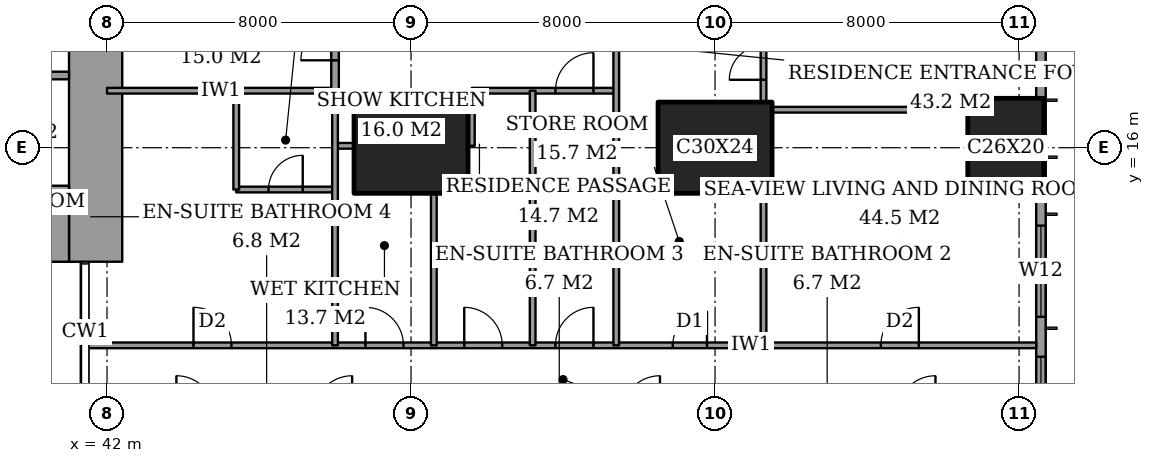
"""IFC4 building model, lengths in metres.
Left out: names, types, materials, properties, quantities, classifications, styles, units other than length and angle.
Written with IfcOpenShell. Run it as: python <this file> out.ifc"""

import sys

from ifc_helpers import new_model, si_unit, direction, frame, frame_2d, origin, origin_2d, place, context, subcontext, project, spatial, rectangle, extrude, element, fill, save


model = new_model("IFC4")
c1 = context("Model", 3, precision=1e-05, world=origin(), true_north=direction((0.0, 1.0)))
c2 = subcontext(c1, "Body", "Model", "MODEL_VIEW")
j1 = project(units=[si_unit("LENGTHUNIT", "METRE"), si_unit("PLANEANGLEUNIT", "RADIAN")], contexts=[c1])
p1 = place(None, origin())
s1 = spatial("IfcSite", under=j1, at=p1, CompositionType="ELEMENT")
p2 = place(p1, origin())
s2 = spatial("IfcBuilding", under=s1, at=p2, CompositionType="ELEMENT")
p3 = place(p2, frame((0.0, 0.0, 128.6)))
s3 = spatial("IfcBuildingStorey", under=s2, at=p3, CompositionType="ELEMENT", Elevation=128.6)
for number, where, z_axis, x_axis in (
    (1, (50.0, 16.0, 0.0), (0.0, 0.0, 1.0), (1.0, 0.0, 0.0)),
    (2, (58.0, 16.0, 0.0), (0.0, 0.0, 1.0), (1.0, 0.0, 0.0)),
):
    element("IfcColumn", number, at=place(p3, frame(where, z_axis=z_axis, x_axis=x_axis)), inside=s3, PredefinedType="COLUMN", context=c2, shape_type="SweptSolid", body=[
        extrude(rectangle(XDim=3.0, YDim=2.4, at=origin_2d()), origin(), (0.0, 0.0, 1.0), 3.6),
    ])
p4 = place(p3, frame((65.65, 16.0, 0.0), z_axis=(0.0, 0.0, 1.0), x_axis=(0.0, 1.0, 0.0)))
e3 = element("IfcColumn", 3, at=p4, inside=s3, PredefinedType="COLUMN", context=c2, shape_type="SweptSolid", body=[
    extrude(rectangle(XDim=2.6, YDim=2.0, at=origin_2d()), origin(), (0.0, 0.0, 1.0), 3.6),
])
p5 = place(p3, frame((37.85, 14.0, 0.0), z_axis=(0.0, 0.0, 1.0), x_axis=(1.0, 0.0, 0.0)))
e4 = element("IfcWall", 4, at=p5, inside=s3, PredefinedType="SHEAR", context=c2, shape_type="SweptSolid", body=[
    extrude(rectangle(XDim=3.15, YDim=2.0, at=frame_2d((1.575, 0.0))), origin(), (0.0, 0.0, 1.0), 3.6),
])
p6 = place(p3, frame((41.7, 13.0, 0.0), z_axis=(0.0, 0.0, 1.0), x_axis=(0.0, 1.0, 0.0)))
e5 = element("IfcWall", 5, at=p6, inside=s3, PredefinedType="SHEAR", context=c2, shape_type="SweptSolid", body=[
    extrude(rectangle(XDim=11.85, YDim=1.4, at=frame_2d((5.925, 0.0))), origin(), (0.0, 0.0, 1.0), 3.6),
])
p7 = place(p6, frame((7.5, 0.0, 0.0)))
e6 = element("IfcOpeningElement", 6, at=p7, cuts=e5, PredefinedType="OPENING", context=c2, shape_type="SweptSolid", body=[
    extrude(rectangle(XDim=1.8, YDim=2.4, at=frame_2d((0.9, 1.2))), frame((0.0, 0.71, 0.0), z_axis=(0.0, -1.0, 0.0), x_axis=(1.0, 0.0, 0.0)), (0.0, 0.0, 1.0), 1.42),
])
p8 = place(p3, frame((66.575, 3.175, 0.0), z_axis=(0.0, 0.0, 1.0), x_axis=(0.0, 1.0, 0.0)))
e7 = element("IfcWall", 7, at=p8, inside=s3, PredefinedType="SOLIDWALL", context=c2, shape_type="SweptSolid", body=[
    extrude(rectangle(XDim=41.65, YDim=0.25, at=frame_2d((20.825, 0.0))), origin(), (0.0, 0.0, 1.0), 3.6),
])
p9 = place(p8, frame((0.775, 0.0, 0.4)))
e8 = element("IfcOpeningElement", 8, at=p9, cuts=e7, PredefinedType="OPENING", context=c2, shape_type="SweptSolid", body=[
    extrude(rectangle(XDim=2.4, YDim=2.2, at=frame_2d((1.2, 1.1))), frame((0.0, 0.135, 0.0), z_axis=(0.0, -1.0, 0.0), x_axis=(1.0, 0.0, 0.0)), (0.0, 0.0, 1.0), 0.27),
])
p10 = place(p8, frame((6.125, 0.0, 0.4)))
e9 = element("IfcOpeningElement", 9, at=p10, cuts=e7, PredefinedType="OPENING", context=c2, shape_type="SweptSolid", body=[
    extrude(rectangle(XDim=1.2, YDim=2.2, at=frame_2d((0.6, 1.1))), frame((0.0, 0.135, 0.0), z_axis=(0.0, -1.0, 0.0), x_axis=(1.0, 0.0, 0.0)), (0.0, 0.0, 1.0), 0.27),
])
p11 = place(p8, frame((8.375, 0.0, 0.4)))
e10 = element("IfcOpeningElement", 10, at=p11, cuts=e7, PredefinedType="OPENING", context=c2, shape_type="SweptSolid", body=[
    extrude(rectangle(XDim=2.4, YDim=2.2, at=frame_2d((1.2, 1.1))), frame((0.0, 0.135, 0.0), z_axis=(0.0, -1.0, 0.0), x_axis=(1.0, 0.0, 0.0)), (0.0, 0.0, 1.0), 0.27),
])
p12 = place(p8, frame((15.775, 0.0, 0.4)))
e11 = element("IfcOpeningElement", 11, at=p12, cuts=e7, PredefinedType="OPENING", context=c2, shape_type="SweptSolid", body=[
    extrude(rectangle(XDim=2.4, YDim=2.2, at=frame_2d((1.2, 1.1))), frame((0.0, 0.135, 0.0), z_axis=(0.0, -1.0, 0.0), x_axis=(1.0, 0.0, 0.0)), (0.0, 0.0, 1.0), 0.27),
])
p13 = place(p8, frame((23.475, 0.0, 0.4)))
e12 = element("IfcOpeningElement", 12, at=p13, cuts=e7, PredefinedType="OPENING", context=c2, shape_type="SweptSolid", body=[
    extrude(rectangle(XDim=2.4, YDim=2.2, at=frame_2d((1.2, 1.1))), frame((0.0, 0.135, 0.0), z_axis=(0.0, -1.0, 0.0), x_axis=(1.0, 0.0, 0.0)), (0.0, 0.0, 1.0), 0.27),
])
p14 = place(p8, frame((30.975, 0.0, 0.4)))
e13 = element("IfcOpeningElement", 13, at=p14, cuts=e7, PredefinedType="OPENING", context=c2, shape_type="SweptSolid", body=[
    extrude(rectangle(XDim=2.4, YDim=2.2, at=frame_2d((1.2, 1.1))), frame((0.0, 0.135, 0.0), z_axis=(0.0, -1.0, 0.0), x_axis=(1.0, 0.0, 0.0)), (0.0, 0.0, 1.0), 0.27),
])
p15 = place(p8, frame((34.5, 0.0, 0.4)))
e14 = element("IfcOpeningElement", 14, at=p15, cuts=e7, PredefinedType="OPENING", context=c2, shape_type="SweptSolid", body=[
    extrude(rectangle(XDim=1.2, YDim=2.2, at=frame_2d((0.6, 1.1))), frame((0.0, 0.135, 0.0), z_axis=(0.0, -1.0, 0.0), x_axis=(1.0, 0.0, 0.0)), (0.0, 0.0, 1.0), 0.27),
])
p16 = place(p8, frame((38.475, 0.0, 0.4)))
e15 = element("IfcOpeningElement", 15, at=p16, cuts=e7, PredefinedType="OPENING", context=c2, shape_type="SweptSolid", body=[
    extrude(rectangle(XDim=2.4, YDim=2.2, at=frame_2d((1.2, 1.1))), frame((0.0, 0.135, 0.0), z_axis=(0.0, -1.0, 0.0), x_axis=(1.0, 0.0, 0.0)), (0.0, 0.0, 1.0), 0.27),
])
p17 = place(p3, frame((41.439, 10.8, 0.0), z_axis=(0.0, 0.0, 1.0), x_axis=(1.0, 0.0, 0.0)))
e16 = element("IfcWall", 16, at=p17, inside=s3, PredefinedType="PARTITIONING", context=c2, shape_type="SweptSolid", body=[
    extrude(rectangle(XDim=25.011, YDim=0.15, at=frame_2d((12.505, 0.0))), origin(), (0.0, 0.0, 1.0), 3.35),
])
p18 = place(p17, frame((12.361, 0.0, 0.0)))
e17 = element("IfcOpeningElement", 17, at=p18, cuts=e16, PredefinedType="OPENING", context=c2, shape_type="SweptSolid", body=[
    extrude(rectangle(XDim=1.0, YDim=2.1, at=frame_2d((0.5, 1.05))), frame((0.0, 0.085, 0.0), z_axis=(0.0, -1.0, 0.0), x_axis=(1.0, 0.0, 0.0)), (0.0, 0.0, 1.0), 0.17),
])
p19 = place(p17, frame((20.924, 0.0, 0.0)))
e18 = element("IfcOpeningElement", 18, at=p19, cuts=e16, PredefinedType="OPENING", context=c2, shape_type="SweptSolid", body=[
    extrude(rectangle(XDim=1.0, YDim=2.1, at=frame_2d((0.5, 1.05))), frame((0.0, 0.085, 0.0), z_axis=(0.0, -1.0, 0.0), x_axis=(1.0, 0.0, 0.0)), (0.0, 0.0, 1.0), 0.17),
])
p20 = place(p17, frame((15.448, 0.0, 0.0)))
e19 = element("IfcOpeningElement", 19, at=p20, cuts=e16, PredefinedType="OPENING", context=c2, shape_type="SweptSolid", body=[
    extrude(rectangle(XDim=0.9, YDim=2.1, at=frame_2d((0.45, 1.05))), frame((0.0, 0.085, 0.0), z_axis=(0.0, -1.0, 0.0), x_axis=(1.0, 0.0, 0.0)), (0.0, 0.0, 1.0), 0.17),
])
p21 = place(p17, frame((9.961, 0.0, 0.0)))
e20 = element("IfcOpeningElement", 20, at=p21, cuts=e16, PredefinedType="OPENING", context=c2, shape_type="SweptSolid", body=[
    extrude(rectangle(XDim=1.0, YDim=2.1, at=frame_2d((0.5, 1.05))), frame((0.0, 0.085, 0.0), z_axis=(0.0, -1.0, 0.0), x_axis=(1.0, 0.0, 0.0)), (0.0, 0.0, 1.0), 0.17),
])
p22 = place(p17, frame((7.361, 0.0, 0.0)))
e21 = element("IfcOpeningElement", 21, at=p22, cuts=e16, PredefinedType="OPENING", context=c2, shape_type="SweptSolid", body=[
    extrude(rectangle(XDim=1.0, YDim=2.1, at=frame_2d((0.5, 1.05))), frame((0.0, 0.085, 0.0), z_axis=(0.0, -1.0, 0.0), x_axis=(1.0, 0.0, 0.0)), (0.0, 0.0, 1.0), 0.17),
])
p23 = place(p17, frame((2.836, 0.0, 0.0)))
e22 = element("IfcOpeningElement", 22, at=p23, cuts=e16, PredefinedType="OPENING", context=c2, shape_type="SweptSolid", body=[
    extrude(rectangle(XDim=1.0, YDim=2.1, at=frame_2d((0.5, 1.05))), frame((0.0, 0.085, 0.0), z_axis=(0.0, -1.0, 0.0), x_axis=(1.0, 0.0, 0.0)), (0.0, 0.0, 1.0), 0.17),
])
p24 = place(p3, frame((45.4, 14.9, 0.0), z_axis=(0.0, 0.0, 1.0), x_axis=(1.0, 0.0, 0.0)))
e23 = element("IfcWall", 23, at=p24, inside=s3, PredefinedType="PARTITIONING", context=c2, shape_type="SweptSolid", body=[
    extrude(rectangle(XDim=2.6, YDim=0.15, at=frame_2d((1.3, 0.0))), origin(), (0.0, 0.0, 1.0), 3.35),
])
p25 = place(p24, frame((0.85, 0.0, 0.0)))
e24 = element("IfcOpeningElement", 24, at=p25, cuts=e23, PredefinedType="OPENING", context=c2, shape_type="SweptSolid", body=[
    extrude(rectangle(XDim=0.9, YDim=2.1, at=frame_2d((0.45, 1.05))), frame((0.0, 0.085, 0.0), z_axis=(0.0, -1.0, 0.0), x_axis=(1.0, 0.0, 0.0)), (0.0, 0.0, 1.0), 0.17),
])
p26 = place(p3, frame((55.4, 15.0, 0.0), z_axis=(0.0, 0.0, 1.0), x_axis=(1.0, 0.0, 0.0)))
e25 = element("IfcWall", 25, at=p26, inside=s3, PredefinedType="PARTITIONING", context=c2, shape_type="SweptSolid", body=[
    extrude(rectangle(XDim=1.1, YDim=0.15, at=frame_2d((0.55, 0.0))), origin(), (0.0, 0.0, 1.0), 3.35),
])
p27 = place(p3, frame((48.0, 16.05, 0.0), z_axis=(0.0, 0.0, 1.0), x_axis=(1.0, 0.0, 0.0)))
e26 = element("IfcWall", 26, at=p27, inside=s3, PredefinedType="PARTITIONING", context=c2, shape_type="SweptSolid", body=[
    extrude(rectangle(XDim=0.5, YDim=0.15, at=frame_2d((0.25, 0.0))), origin(), (0.0, 0.0, 1.0), 3.35),
])
p28 = place(p3, frame((59.5, 17.0, 0.0), z_axis=(0.0, 0.0, 1.0), x_axis=(1.0, 0.0, 0.0)))
e27 = element("IfcWall", 27, at=p28, inside=s3, PredefinedType="PARTITIONING", context=c2, shape_type="SweptSolid", body=[
    extrude(rectangle(XDim=5.15, YDim=0.15, at=frame_2d((2.575, 0.0))), origin(), (0.0, 0.0, 1.0), 3.35),
])
p29 = place(p3, frame((42.0, 17.5, 0.0), z_axis=(0.0, 0.0, 1.0), x_axis=(1.0, 0.0, 0.0)))
e28 = element("IfcWall", 28, at=p29, inside=s3, PredefinedType="PARTITIONING", context=c2, shape_type="SweptSolid", body=[
    extrude(rectangle(XDim=6.0, YDim=0.15, at=frame_2d((3.0, 0.0))), origin(), (0.0, 0.0, 1.0), 3.35),
])
p30 = place(p3, frame((51.6, 17.5, 0.0), z_axis=(0.0, 0.0, 1.0), x_axis=(1.0, 0.0, 0.0)))
e29 = element("IfcWall", 29, at=p30, inside=s3, PredefinedType="PARTITIONING", context=c2, shape_type="SweptSolid", body=[
    extrude(rectangle(XDim=3.8, YDim=0.15, at=frame_2d((1.9, 0.0))), origin(), (0.0, 0.0, 1.0), 3.35),
])
p31 = place(p30, frame((2.2, 0.0, 0.0)))
e30 = element("IfcOpeningElement", 30, at=p31, cuts=e29, PredefinedType="OPENING", context=c2, shape_type="SweptSolid", body=[
    extrude(rectangle(XDim=1.0, YDim=2.1, at=frame_2d((0.5, 1.05))), frame((0.0, 0.085, 0.0), z_axis=(0.0, -1.0, 0.0), x_axis=(1.0, 0.0, 0.0)), (0.0, 0.0, 1.0), 0.17),
])
p32 = place(p3, frame((45.4, 14.9, 0.0), z_axis=(0.0, 0.0, 1.0), x_axis=(0.0, 1.0, 0.0)))
e31 = element("IfcWall", 31, at=p32, inside=s3, PredefinedType="PARTITIONING", context=c2, shape_type="SweptSolid", body=[
    extrude(rectangle(XDim=2.6, YDim=0.15, at=frame_2d((1.3, 0.0))), origin(), (0.0, 0.0, 1.0), 3.35),
])
p33 = place(p3, frame((48.0, 17.5, 0.0), z_axis=(0.0, 0.0, 1.0), x_axis=(0.0, 1.0, 0.0)))
e32 = element("IfcWall", 32, at=p33, inside=s3, PredefinedType="PARTITIONING", context=c2, shape_type="SweptSolid", body=[
    extrude(rectangle(XDim=6.5, YDim=0.2, at=frame_2d((3.25, 0.0))), origin(), (0.0, 0.0, 1.0), 3.35),
])
p34 = place(p33, frame((3.9, 0.0, 0.0)))
e33 = element("IfcOpeningElement", 33, at=p34, cuts=e32, PredefinedType="OPENING", context=c2, shape_type="SweptSolid", body=[
    extrude(rectangle(XDim=1.2, YDim=2.4, at=frame_2d((0.6, 1.2))), frame((0.0, 0.11, 0.0), z_axis=(0.0, -1.0, 0.0), x_axis=(1.0, 0.0, 0.0)), (0.0, 0.0, 1.0), 0.22),
])
p35 = place(p33, frame((0.8, 0.0, 0.0)))
e34 = element("IfcOpeningElement", 34, at=p35, cuts=e32, PredefinedType="OPENING", context=c2, shape_type="SweptSolid", body=[
    extrude(rectangle(XDim=0.9, YDim=2.1, at=frame_2d((0.45, 1.05))), frame((0.0, 0.11, 0.0), z_axis=(0.0, -1.0, 0.0), x_axis=(1.0, 0.0, 0.0)), (0.0, 0.0, 1.0), 0.22),
])
p36 = place(p3, frame((48.0, 10.8, 0.0), z_axis=(0.0, 0.0, 1.0), x_axis=(0.0, 1.0, 0.0)))
e35 = element("IfcWall", 35, at=p36, inside=s3, PredefinedType="PARTITIONING", context=c2, shape_type="SweptSolid", body=[
    extrude(rectangle(XDim=6.7, YDim=0.15, at=frame_2d((3.35, 0.0))), origin(), (0.0, 0.0, 1.0), 3.35),
])
p37 = place(p3, frame((50.6, 10.8, 0.0), z_axis=(0.0, 0.0, 1.0), x_axis=(0.0, 1.0, 0.0)))
e36 = element("IfcWall", 36, at=p37, inside=s3, PredefinedType="PARTITIONING", context=c2, shape_type="SweptSolid", body=[
    extrude(rectangle(XDim=4.0, YDim=0.15, at=frame_2d((2.0, 0.0))), origin(), (0.0, 0.0, 1.0), 3.35),
])
p38 = place(p3, frame((51.6, 16.05, 0.0), z_axis=(0.0, 0.0, 1.0), x_axis=(0.0, 1.0, 0.0)))
e37 = element("IfcWall", 37, at=p38, inside=s3, PredefinedType="PARTITIONING", context=c2, shape_type="SweptSolid", body=[
    extrude(rectangle(XDim=1.45, YDim=0.15, at=frame_2d((0.725, 0.0))), origin(), (0.0, 0.0, 1.0), 3.35),
])
p39 = place(p3, frame((53.2, 10.8, 0.0), z_axis=(0.0, 0.0, 1.0), x_axis=(0.0, 1.0, 0.0)))
e38 = element("IfcWall", 38, at=p39, inside=s3, PredefinedType="PARTITIONING", context=c2, shape_type="SweptSolid", body=[
    extrude(rectangle(XDim=6.7, YDim=0.15, at=frame_2d((3.35, 0.0))), origin(), (0.0, 0.0, 1.0), 3.35),
])
p40 = place(p3, frame((55.4, 10.8, 0.0), z_axis=(0.0, 0.0, 1.0), x_axis=(0.0, 1.0, 0.0)))
e39 = element("IfcWall", 39, at=p40, inside=s3, PredefinedType="PARTITIONING", context=c2, shape_type="SweptSolid", body=[
    extrude(rectangle(XDim=10.8, YDim=0.15, at=frame_2d((5.4, 0.0))), origin(), (0.0, 0.0, 1.0), 3.35),
])
p41 = place(p40, frame((8.25, 0.0, 0.0)))
e40 = element("IfcOpeningElement", 40, at=p41, cuts=e39, PredefinedType="OPENING", context=c2, shape_type="SweptSolid", body=[
    extrude(rectangle(XDim=1.0, YDim=2.1, at=frame_2d((0.5, 1.05))), frame((0.0, 0.085, 0.0), z_axis=(0.0, -1.0, 0.0), x_axis=(1.0, 0.0, 0.0)), (0.0, 0.0, 1.0), 0.17),
])
p42 = place(p3, frame((59.275, 10.8, 0.0), z_axis=(0.0, 0.0, 1.0), x_axis=(0.0, 1.0, 0.0)))
e41 = element("IfcWall", 41, at=p42, inside=s3, PredefinedType="PARTITIONING", context=c2, shape_type="SweptSolid", body=[
    extrude(rectangle(XDim=4.0, YDim=0.15, at=frame_2d((2.0, 0.0))), origin(), (0.0, 0.0, 1.0), 3.35),
])
p43 = place(p3, frame((59.275, 17.2, 0.0), z_axis=(0.0, 0.0, 1.0), x_axis=(0.0, 1.0, 0.0)))
e42 = element("IfcWall", 42, at=p43, inside=s3, PredefinedType="PARTITIONING", context=c2, shape_type="SweptSolid", body=[
    extrude(rectangle(XDim=2.45, YDim=0.15, at=frame_2d((1.225, 0.0))), origin(), (0.0, 0.0, 1.0), 3.35),
])
p44 = place(p43, frame((0.587, 0.0, 0.0)))
e43 = element("IfcOpeningElement", 43, at=p44, cuts=e42, PredefinedType="OPENING", context=c2, shape_type="SweptSolid", body=[
    extrude(rectangle(XDim=0.9, YDim=2.1, at=frame_2d((0.45, 1.05))), frame((0.0, 0.085, 0.0), z_axis=(0.0, -1.0, 0.0), x_axis=(1.0, 0.0, 0.0)), (0.0, 0.0, 1.0), 0.17),
])
p45 = place(p3, frame((28.3, 17.9, 0.0), z_axis=(0.0, 0.0, 1.0), x_axis=(1.0, 0.0, 0.0)))
e44 = element("IfcWall", 44, at=p45, inside=s3, PredefinedType="PARTITIONING", context=c2, shape_type="SweptSolid", body=[
    extrude(rectangle(XDim=12.7, YDim=0.2, at=frame_2d((6.35, 0.0))), origin(), (0.0, 0.0, 1.0), 3.6),
])
p46 = place(p45, frame((0.95, 0.0, 0.0)))
e45 = element("IfcOpeningElement", 45, at=p46, cuts=e44, PredefinedType="OPENING", context=c2, shape_type="SweptSolid", body=[
    extrude(rectangle(XDim=1.1, YDim=2.1, at=frame_2d((0.55, 1.05))), frame((0.0, 0.11, 0.0), z_axis=(0.0, -1.0, 0.0), x_axis=(1.0, 0.0, 0.0)), (0.0, 0.0, 1.0), 0.22),
])
p47 = place(p45, frame((4.15, 0.0, 0.0)))
e46 = element("IfcOpeningElement", 46, at=p47, cuts=e44, PredefinedType="OPENING", context=c2, shape_type="SweptSolid", body=[
    extrude(rectangle(XDim=1.1, YDim=2.1, at=frame_2d((0.55, 1.05))), frame((0.0, 0.11, 0.0), z_axis=(0.0, -1.0, 0.0), x_axis=(1.0, 0.0, 0.0)), (0.0, 0.0, 1.0), 0.22),
])
p48 = place(p45, frame((7.35, 0.0, 0.0)))
e47 = element("IfcOpeningElement", 47, at=p48, cuts=e44, PredefinedType="OPENING", context=c2, shape_type="SweptSolid", body=[
    extrude(rectangle(XDim=1.1, YDim=2.1, at=frame_2d((0.55, 1.05))), frame((0.0, 0.11, 0.0), z_axis=(0.0, -1.0, 0.0), x_axis=(1.0, 0.0, 0.0)), (0.0, 0.0, 1.0), 0.22),
])
p49 = place(p45, frame((10.6, 0.0, 0.0)))
e48 = element("IfcOpeningElement", 48, at=p49, cuts=e44, PredefinedType="OPENING", context=c2, shape_type="SweptSolid", body=[
    extrude(rectangle(XDim=1.2, YDim=2.1, at=frame_2d((0.6, 1.05))), frame((0.0, 0.11, 0.0), z_axis=(0.0, -1.0, 0.0), x_axis=(1.0, 0.0, 0.0)), (0.0, 0.0, 1.0), 0.22),
])
p50 = place(p10, origin())
e49 = element("IfcWindow", 49, at=p50, inside=s3, PartitioningType="SINGLE_PANEL", PredefinedType="WINDOW", context=c2, shape_type="SweptSolid", body=[
    extrude(rectangle(XDim=1.2, YDim=2.2, at=frame_2d((0.6, 1.1))), frame((0.0, 0.03, 0.0), z_axis=(0.0, -1.0, 0.0), x_axis=(1.0, 0.0, 0.0)), (0.0, 0.0, 1.0), 0.06),
])
fill(e9, e49)
p51 = place(p11, origin())
e50 = element("IfcWindow", 50, at=p51, inside=s3, PartitioningType="SINGLE_PANEL", PredefinedType="WINDOW", context=c2, shape_type="SweptSolid", body=[
    extrude(rectangle(XDim=2.4, YDim=2.2, at=frame_2d((1.2, 1.1))), frame((0.0, 0.03, 0.0), z_axis=(0.0, -1.0, 0.0), x_axis=(1.0, 0.0, 0.0)), (0.0, 0.0, 1.0), 0.06),
])
fill(e10, e50)
p52 = place(p18, origin())
e51 = element("IfcDoor", 51, at=p52, inside=s3, OperationType="SINGLE_SWING_LEFT", PredefinedType="DOOR", context=c2, shape_type="SweptSolid", body=[
    extrude(rectangle(XDim=1.0, YDim=2.1, at=frame_2d((0.5, 1.05))), frame((0.0, 0.025, 0.0), z_axis=(0.0, -1.0, 0.0), x_axis=(1.0, 0.0, 0.0)), (0.0, 0.0, 1.0), 0.05),
])
fill(e17, e51)
p53 = place(p19, origin())
e52 = element("IfcDoor", 52, at=p53, inside=s3, OperationType="SINGLE_SWING_LEFT", PredefinedType="DOOR", context=c2, shape_type="SweptSolid", body=[
    extrude(rectangle(XDim=1.0, YDim=2.1, at=frame_2d((0.5, 1.05))), frame((0.0, 0.025, 0.0), z_axis=(0.0, -1.0, 0.0), x_axis=(1.0, 0.0, 0.0)), (0.0, 0.0, 1.0), 0.05),
])
fill(e18, e52)
p54 = place(p44, origin())
e53 = element("IfcDoor", 53, at=p54, inside=s3, OperationType="SINGLE_SWING_RIGHT", PredefinedType="DOOR", context=c2, shape_type="SweptSolid", body=[
    extrude(rectangle(XDim=0.9, YDim=2.1, at=frame_2d((0.45, 1.05))), frame((0.0, 0.025, 0.0), z_axis=(0.0, -1.0, 0.0), x_axis=(1.0, 0.0, 0.0)), (0.0, 0.0, 1.0), 0.05),
])
fill(e43, e53)
p55 = place(p20, origin())
e54 = element("IfcDoor", 54, at=p55, inside=s3, OperationType="SINGLE_SWING_LEFT", PredefinedType="DOOR", context=c2, shape_type="SweptSolid", body=[
    extrude(rectangle(XDim=0.9, YDim=2.1, at=frame_2d((0.45, 1.05))), frame((0.0, 0.025, 0.0), z_axis=(0.0, -1.0, 0.0), x_axis=(1.0, 0.0, 0.0)), (0.0, 0.0, 1.0), 0.05),
])
fill(e19, e54)
p56 = place(p31, origin())
e55 = element("IfcDoor", 55, at=p56, inside=s3, OperationType="SINGLE_SWING_LEFT", PredefinedType="DOOR", context=c2, shape_type="SweptSolid", body=[
    extrude(rectangle(XDim=1.0, YDim=2.1, at=frame_2d((0.5, 1.05))), frame((0.0, 0.025, 0.0), z_axis=(0.0, -1.0, 0.0), x_axis=(1.0, 0.0, 0.0)), (0.0, 0.0, 1.0), 0.05),
])
fill(e30, e55)
p57 = place(p21, origin())
e56 = element("IfcDoor", 56, at=p57, inside=s3, OperationType="SINGLE_SWING_RIGHT", PredefinedType="DOOR", context=c2, shape_type="SweptSolid", body=[
    extrude(rectangle(XDim=1.0, YDim=2.1, at=frame_2d((0.5, 1.05))), frame((0.0, 0.025, 0.0), z_axis=(0.0, -1.0, 0.0), x_axis=(1.0, 0.0, 0.0)), (0.0, 0.0, 1.0), 0.05),
])
fill(e20, e56)
p58 = place(p22, origin())
e57 = element("IfcDoor", 57, at=p58, inside=s3, OperationType="SINGLE_SWING_RIGHT", PredefinedType="DOOR", context=c2, shape_type="SweptSolid", body=[
    extrude(rectangle(XDim=1.0, YDim=2.1, at=frame_2d((0.5, 1.05))), frame((0.0, 0.025, 0.0), z_axis=(0.0, -1.0, 0.0), x_axis=(1.0, 0.0, 0.0)), (0.0, 0.0, 1.0), 0.05),
])
fill(e21, e57)
p59 = place(p25, origin())
e58 = element("IfcDoor", 58, at=p59, inside=s3, OperationType="SINGLE_SWING_LEFT", PredefinedType="DOOR", context=c2, shape_type="SweptSolid", body=[
    extrude(rectangle(XDim=0.9, YDim=2.1, at=frame_2d((0.45, 1.05))), frame((0.0, 0.025, 0.0), z_axis=(0.0, -1.0, 0.0), x_axis=(1.0, 0.0, 0.0)), (0.0, 0.0, 1.0), 0.05),
])
fill(e24, e58)
p60 = place(p23, origin())
e59 = element("IfcDoor", 59, at=p60, inside=s3, OperationType="SINGLE_SWING_RIGHT", PredefinedType="DOOR", context=c2, shape_type="SweptSolid", body=[
    extrude(rectangle(XDim=1.0, YDim=2.1, at=frame_2d((0.5, 1.05))), frame((0.0, 0.025, 0.0), z_axis=(0.0, -1.0, 0.0), x_axis=(1.0, 0.0, 0.0)), (0.0, 0.0, 1.0), 0.05),
])
fill(e22, e59)
p61 = place(p35, origin())
e60 = element("IfcDoor", 60, at=p61, inside=s3, OperationType="SINGLE_SWING_RIGHT", PredefinedType="DOOR", context=c2, shape_type="SweptSolid", body=[
    extrude(rectangle(XDim=0.9, YDim=2.1, at=frame_2d((0.45, 1.05))), frame((0.0, 0.025, 0.0), z_axis=(0.0, -1.0, 0.0), x_axis=(1.0, 0.0, 0.0)), (0.0, 0.0, 1.0), 0.05),
])
fill(e34, e60)
save(model, sys.argv[1])
